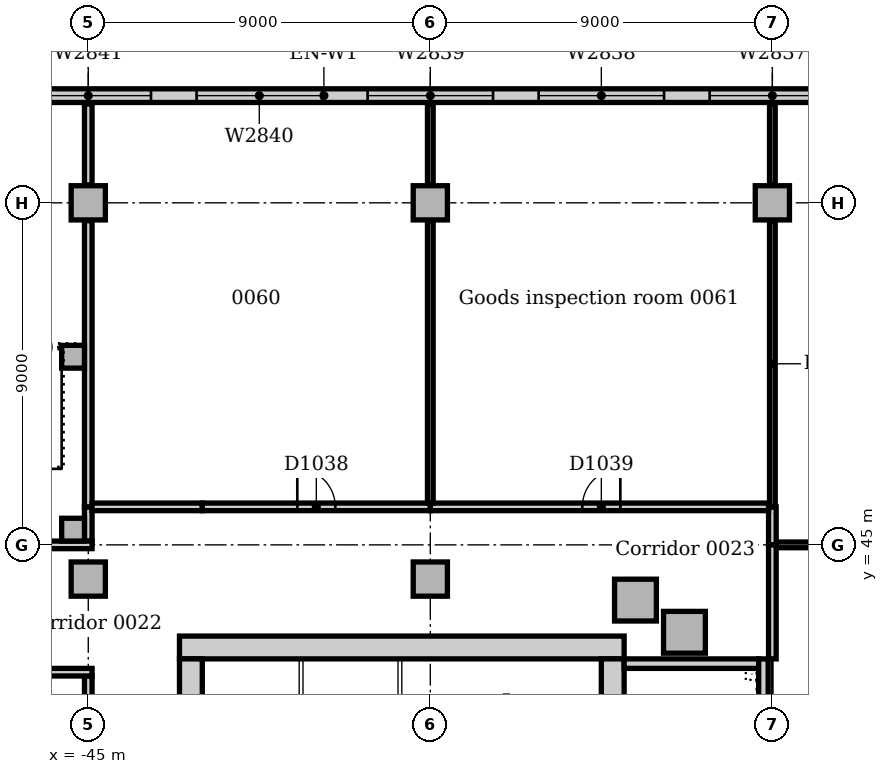
"""IFC4 building model, lengths in metres.
Left out: names, types, materials, properties, quantities, classifications, styles, units other than length and angle.
Written with IfcOpenShell. Run it as: python <this file> out.ifc"""

import sys

from ifc_helpers import new_model, si_unit, direction, frame, frame_2d, origin, origin_2d, place, context, subcontext, project, spatial, rectangle, extrude, element, fill, save


model = new_model("IFC4")
c1 = context("Model", 3, precision=1e-05, world=origin(), true_north=direction((0.0, 1.0)))
c2 = subcontext(c1, "Body", "Model", "MODEL_VIEW")
j1 = project(units=[si_unit("LENGTHUNIT", "METRE"), si_unit("PLANEANGLEUNIT", "RADIAN")], contexts=[c1])
p1 = place(None, origin())
s1 = spatial("IfcSite", under=j1, at=p1, CompositionType="ELEMENT")
p2 = place(p1, origin())
s2 = spatial("IfcBuilding", under=s1, at=p2, CompositionType="ELEMENT")
p3 = place(p2, origin())
s3 = spatial("IfcBuildingStorey", under=s2, at=p3, CompositionType="ELEMENT", Elevation=0.0)
p4 = place(p3, frame((-30.9, 42.3, 0.0), z_axis=(0.0, 0.0, 1.0), x_axis=(-1.0, 0.0, 0.0)))
e1 = element("IfcWall", 1, at=p4, inside=s3, PredefinedType="SOLIDWALL", context=c2, shape_type="SweptSolid", body=[
    extrude(rectangle(XDim=11.7, YDim=0.6, at=frame_2d((5.85, 0.0))), origin(), (0.0, 0.0, 1.0), 6.0),
])
p5 = place(p3, frame((-31.2, 30.5, 0.0), z_axis=(0.0, 0.0, 1.0), x_axis=(0.0, 1.0, 0.0)))
e2 = element("IfcWall", 2, at=p5, inside=s3, PredefinedType="SOLIDWALL", context=c2, shape_type="SweptSolid", body=[
    extrude(rectangle(XDim=11.5, YDim=0.6, at=frame_2d((5.75, 0.0))), origin(), (0.0, 0.0, 1.0), 6.0),
])
p6 = place(p5, frame((0.85, 0.0, 0.0)))
e3 = element("IfcOpeningElement", 3, at=p6, cuts=e2, PredefinedType="OPENING", context=c2, shape_type="SweptSolid", body=[
    extrude(rectangle(XDim=1.8, YDim=2.1, at=frame_2d((0.9, 1.05))), frame((0.0, 0.31, 0.0), z_axis=(0.0, -1.0, 0.0), x_axis=(1.0, 0.0, 0.0)), (0.0, 0.0, 1.0), 0.62),
])
p7 = place(p3, frame((-42.3, 42.0, 0.0), z_axis=(0.0, 0.0, 1.0), x_axis=(0.0, -1.0, 0.0)))
e4 = element("IfcWall", 4, at=p7, inside=s3, PredefinedType="SOLIDWALL", context=c2, shape_type="SweptSolid", body=[
    extrude(rectangle(XDim=11.5, YDim=0.6, at=frame_2d((5.75, 0.0))), origin(), (0.0, 0.0, 1.0), 6.0),
])
p8 = place(p7, frame((8.85, 0.0, 0.0)))
e5 = element("IfcOpeningElement", 5, at=p8, cuts=e4, PredefinedType="OPENING", context=c2, shape_type="SweptSolid", body=[
    extrude(rectangle(XDim=1.8, YDim=2.1, at=frame_2d((0.9, 1.05))), frame((0.0, 0.31, 0.0), z_axis=(0.0, -1.0, 0.0), x_axis=(1.0, 0.0, 0.0)), (0.0, 0.0, 1.0), 0.62),
])
p9 = place(p3, frame((-27.36, 41.875, 0.0), z_axis=(0.0, 0.0, 1.0), x_axis=(-1.0, 0.0, 0.0)))
e6 = element("IfcWall", 6, at=p9, inside=s3, PredefinedType="SOLIDWALL", context=c2, shape_type="SweptSolid", body=[
    extrude(rectangle(XDim=3.54, YDim=0.25, at=frame_2d((1.77, 0.0))), origin(), (0.0, 0.0, 1.0), 6.0),
])
p10 = place(p3, frame((-27.235, 35.35, 0.0), z_axis=(0.0, 0.0, 1.0), x_axis=(0.0, 1.0, 0.0)))
e7 = element("IfcWall", 7, at=p10, inside=s3, PredefinedType="SOLIDWALL", context=c2, shape_type="SweptSolid", body=[
    extrude(rectangle(XDim=6.65, YDim=0.25, at=frame_2d((3.325, 0.0))), origin(), (0.0, 0.0, 1.0), 6.0),
])
for number, where, z_axis, x_axis in (
    (8, (-29.313, 42.7, 0.0), (0.0, 0.0, 1.0), (1.0, 0.0, 0.0)),
    (9, (-30.602, 43.547, 0.0), (0.0, 0.0, 1.0), (1.0, 0.0, 0.0)),
):
    element("IfcColumn", number, at=place(p3, frame(where, z_axis=z_axis, x_axis=x_axis)), inside=s3, PredefinedType="COLUMN", context=c2, shape_type="SweptSolid", body=[
        extrude(rectangle(XDim=1.1, YDim=1.1, at=origin_2d()), origin(), (0.0, 0.0, 1.0), 5.7),
    ])
for number, where, z_axis, x_axis in (
    (10, (-45.0, 44.1, 0.0), (0.0, 0.0, 1.0), (1.0, 0.0, 0.0)),
    (11, (-36.0, 44.1, 0.0), (0.0, 0.0, 1.0), (1.0, 0.0, 0.0)),
    (12, (-45.0, 54.0, 0.0), (0.0, 0.0, 1.0), (1.0, 0.0, 0.0)),
    (13, (-36.0, 54.0, 0.0), (0.0, 0.0, 1.0), (1.0, 0.0, 0.0)),
    (14, (-27.0, 54.0, 0.0), (0.0, 0.0, 1.0), (1.0, 0.0, 0.0)),
):
    element("IfcColumn", number, at=place(p3, frame(where, z_axis=z_axis, x_axis=x_axis)), inside=s3, PredefinedType="COLUMN", context=c2, shape_type="SweptSolid", body=[
        extrude(rectangle(XDim=0.9, YDim=0.9, at=origin_2d()), origin(), (0.0, 0.0, 1.0), 5.7),
    ])
p11 = place(p3, frame((3.4, 56.82, 0.0), z_axis=(0.0, 0.0, 1.0), x_axis=(-1.0, 0.0, 0.0)))
e15 = element("IfcWall", 15, at=p11, inside=s3, PredefinedType="STANDARD", context=c2, shape_type="SweptSolid", body=[
    extrude(rectangle(XDim=84.4, YDim=0.36, at=frame_2d((42.2, 0.0))), origin(), (0.0, 0.0, 1.0), 5.7),
])
p12 = place(p11, frame((15.7, 0.0, 0.0)))
e16 = element("IfcOpeningElement", 16, at=p12, cuts=e15, PredefinedType="OPENING", context=c2, shape_type="SweptSolid", body=[
    extrude(rectangle(XDim=2.4, YDim=2.4, at=frame_2d((1.2, 1.2))), frame((0.0, 0.19, 0.0), z_axis=(0.0, -1.0, 0.0), x_axis=(1.0, 0.0, 0.0)), (0.0, 0.0, 1.0), 0.38),
])
p13 = place(p11, frame((76.6, 0.0, 0.0)))
e17 = element("IfcOpeningElement", 17, at=p13, cuts=e15, PredefinedType="OPENING", context=c2, shape_type="SweptSolid", body=[
    extrude(rectangle(XDim=6.6, YDim=4.2, at=frame_2d((3.3, 2.1))), frame((0.0, 0.19, 0.0), z_axis=(0.0, -1.0, 0.0), x_axis=(1.0, 0.0, 0.0)), (0.0, 0.0, 1.0), 0.38),
])
p14 = place(p11, frame((59.65, 0.0, 0.0)))
e18 = element("IfcOpeningElement", 18, at=p14, cuts=e15, PredefinedType="OPENING", context=c2, shape_type="SweptSolid", body=[
    extrude(rectangle(XDim=4.5, YDim=4.2, at=frame_2d((2.25, 2.1))), frame((0.0, 0.19, 0.0), z_axis=(0.0, -1.0, 0.0), x_axis=(1.0, 0.0, 0.0)), (0.0, 0.0, 1.0), 0.38),
])
p15 = place(p11, frame((58.3, 0.0, 0.0)))
e19 = element("IfcOpeningElement", 19, at=p15, cuts=e15, PredefinedType="OPENING", context=c2, shape_type="SweptSolid", body=[
    extrude(rectangle(XDim=1.2, YDim=2.2, at=frame_2d((0.6, 1.1))), frame((0.0, 0.19, 0.0), z_axis=(0.0, -1.0, 0.0), x_axis=(1.0, 0.0, 0.0)), (0.0, 0.0, 1.0), 0.38),
])
p16 = place(p11, frame((70.0, 0.0, 0.0)))
e20 = element("IfcOpeningElement", 20, at=p16, cuts=e15, PredefinedType="OPENING", context=c2, shape_type="SweptSolid", body=[
    extrude(rectangle(XDim=1.8, YDim=2.2, at=frame_2d((0.9, 1.1))), frame((0.0, 0.19, 0.0), z_axis=(0.0, -1.0, 0.0), x_axis=(1.0, 0.0, 0.0)), (0.0, 0.0, 1.0), 0.38),
])
p17 = place(p11, frame((52.0, 0.0, 0.0)))
e21 = element("IfcOpeningElement", 21, at=p17, cuts=e15, PredefinedType="OPENING", context=c2, shape_type="SweptSolid", body=[
    extrude(rectangle(XDim=1.8, YDim=2.2, at=frame_2d((0.9, 1.1))), frame((0.0, 0.19, 0.0), z_axis=(0.0, -1.0, 0.0), x_axis=(1.0, 0.0, 0.0)), (0.0, 0.0, 1.0), 0.38),
])
p18 = place(p11, frame((1.75, 0.0, 0.6)))
e22 = element("IfcOpeningElement", 22, at=p18, cuts=e15, PredefinedType="OPENING", context=c2, shape_type="SweptSolid", body=[
    extrude(rectangle(XDim=3.3, YDim=3.0, at=frame_2d((1.65, 1.5))), frame((0.0, 0.19, 0.0), z_axis=(0.0, -1.0, 0.0), x_axis=(1.0, 0.0, 0.0)), (0.0, 0.0, 1.0), 0.38),
])
p19 = place(p11, frame((6.25, 0.0, 0.6)))
e23 = element("IfcOpeningElement", 23, at=p19, cuts=e15, PredefinedType="OPENING", context=c2, shape_type="SweptSolid", body=[
    extrude(rectangle(XDim=3.3, YDim=3.0, at=frame_2d((1.65, 1.5))), frame((0.0, 0.19, 0.0), z_axis=(0.0, -1.0, 0.0), x_axis=(1.0, 0.0, 0.0)), (0.0, 0.0, 1.0), 0.38),
])
p20 = place(p11, frame((10.75, 0.0, 0.6)))
e24 = element("IfcOpeningElement", 24, at=p20, cuts=e15, PredefinedType="OPENING", context=c2, shape_type="SweptSolid", body=[
    extrude(rectangle(XDim=3.3, YDim=3.0, at=frame_2d((1.65, 1.5))), frame((0.0, 0.19, 0.0), z_axis=(0.0, -1.0, 0.0), x_axis=(1.0, 0.0, 0.0)), (0.0, 0.0, 1.0), 0.38),
])
p21 = place(p11, frame((19.75, 0.0, 0.6)))
e25 = element("IfcOpeningElement", 25, at=p21, cuts=e15, PredefinedType="OPENING", context=c2, shape_type="SweptSolid", body=[
    extrude(rectangle(XDim=3.3, YDim=3.0, at=frame_2d((1.65, 1.5))), frame((0.0, 0.19, 0.0), z_axis=(0.0, -1.0, 0.0), x_axis=(1.0, 0.0, 0.0)), (0.0, 0.0, 1.0), 0.38),
])
p22 = place(p11, frame((24.25, 0.0, 0.6)))
e26 = element("IfcOpeningElement", 26, at=p22, cuts=e15, PredefinedType="OPENING", context=c2, shape_type="SweptSolid", body=[
    extrude(rectangle(XDim=3.3, YDim=3.0, at=frame_2d((1.65, 1.5))), frame((0.0, 0.19, 0.0), z_axis=(0.0, -1.0, 0.0), x_axis=(1.0, 0.0, 0.0)), (0.0, 0.0, 1.0), 0.38),
])
p23 = place(p11, frame((28.75, 0.0, 0.6)))
e27 = element("IfcOpeningElement", 27, at=p23, cuts=e15, PredefinedType="OPENING", context=c2, shape_type="SweptSolid", body=[
    extrude(rectangle(XDim=3.3, YDim=3.0, at=frame_2d((1.65, 1.5))), frame((0.0, 0.19, 0.0), z_axis=(0.0, -1.0, 0.0), x_axis=(1.0, 0.0, 0.0)), (0.0, 0.0, 1.0), 0.38),
])
p24 = place(p11, frame((33.25, 0.0, 0.6)))
e28 = element("IfcOpeningElement", 28, at=p24, cuts=e15, PredefinedType="OPENING", context=c2, shape_type="SweptSolid", body=[
    extrude(rectangle(XDim=3.3, YDim=3.0, at=frame_2d((1.65, 1.5))), frame((0.0, 0.19, 0.0), z_axis=(0.0, -1.0, 0.0), x_axis=(1.0, 0.0, 0.0)), (0.0, 0.0, 1.0), 0.38),
])
p25 = place(p11, frame((37.75, 0.0, 0.6)))
e29 = element("IfcOpeningElement", 29, at=p25, cuts=e15, PredefinedType="OPENING", context=c2, shape_type="SweptSolid", body=[
    extrude(rectangle(XDim=3.3, YDim=3.0, at=frame_2d((1.65, 1.5))), frame((0.0, 0.19, 0.0), z_axis=(0.0, -1.0, 0.0), x_axis=(1.0, 0.0, 0.0)), (0.0, 0.0, 1.0), 0.38),
])
p26 = place(p11, frame((42.25, 0.0, 0.6)))
e30 = element("IfcOpeningElement", 30, at=p26, cuts=e15, PredefinedType="OPENING", context=c2, shape_type="SweptSolid", body=[
    extrude(rectangle(XDim=3.3, YDim=3.0, at=frame_2d((1.65, 1.5))), frame((0.0, 0.19, 0.0), z_axis=(0.0, -1.0, 0.0), x_axis=(1.0, 0.0, 0.0)), (0.0, 0.0, 1.0), 0.38),
])
p27 = place(p11, frame((46.75, 0.0, 0.6)))
e31 = element("IfcOpeningElement", 31, at=p27, cuts=e15, PredefinedType="OPENING", context=c2, shape_type="SweptSolid", body=[
    extrude(rectangle(XDim=3.3, YDim=3.0, at=frame_2d((1.65, 1.5))), frame((0.0, 0.19, 0.0), z_axis=(0.0, -1.0, 0.0), x_axis=(1.0, 0.0, 0.0)), (0.0, 0.0, 1.0), 0.38),
])
for number, where, z_axis, x_axis in (
    (32, (-45.4, 49.95, 0.0), (0.0, 0.0, 1.0), (1.0, 0.0, 0.0)),
    (33, (-45.4, 45.4, 0.0), (0.0, 0.0, 1.0), (1.0, 0.0, 0.0)),
):
    element("IfcColumn", number, at=place(p3, frame(where, z_axis=z_axis, x_axis=x_axis)), inside=s3, PredefinedType="COLUMN", context=c2, shape_type="SweptSolid", body=[
        extrude(rectangle(XDim=0.6, YDim=0.6, at=origin_2d()), origin(), (0.0, 0.0, 1.0), 6.0),
    ])
p28 = place(p3, frame((-45.0, 45.1, 0.0), z_axis=(0.0, 0.0, 1.0), x_axis=(0.0, 1.0, 0.0)))
e34 = element("IfcWall", 34, at=p28, inside=s3, PredefinedType="SOLIDWALL", context=c2, shape_type="SweptSolid", body=[
    extrude(rectangle(XDim=0.9, YDim=0.2, at=frame_2d((0.45, 0.0))), origin(), (0.0, 0.0, 1.0), 5.7),
])
p29 = place(p3, frame((-54.0, 45.0, 0.0), z_axis=(0.0, 0.0, 1.0), x_axis=(1.0, 0.0, 0.0)))
e35 = element("IfcWall", 35, at=p29, inside=s3, PredefinedType="SOLIDWALL", context=c2, shape_type="SweptSolid", body=[
    extrude(rectangle(XDim=9.1, YDim=0.2, at=frame_2d((4.55, 0.0))), origin(), (0.0, 0.0, 1.0), 5.7),
])
p30 = place(p3, frame((-45.0, 46.0, 0.0), z_axis=(0.0, 0.0, 1.0), x_axis=(0.0, 1.0, 0.0)))
e36 = element("IfcWall", 36, at=p30, inside=s3, PredefinedType="SOLIDWALL", context=c2, shape_type="SweptSolid", body=[
    extrude(rectangle(XDim=7.53, YDim=0.2, at=frame_2d((3.765, 0.0))), origin(), (0.0, 0.0, 1.0), 5.7),
])
p31 = place(p3, frame((-45.0, 54.47, 0.0), z_axis=(0.0, 0.0, 1.0), x_axis=(0.0, 1.0, 0.0)))
e37 = element("IfcWall", 37, at=p31, inside=s3, PredefinedType="SOLIDWALL", context=c2, shape_type="SweptSolid", body=[
    extrude(rectangle(XDim=2.13, YDim=0.2, at=frame_2d((1.065, 0.0))), origin(), (0.0, 0.0, 1.0), 5.7),
])
p32 = place(p3, frame((-26.9, 45.0, 0.0), z_axis=(0.0, 0.0, 1.0), x_axis=(1.0, 0.0, 0.0)))
e38 = element("IfcWall", 38, at=p32, inside=s3, PredefinedType="PARTITIONING", context=c2, shape_type="SweptSolid", body=[
    extrude(rectangle(XDim=8.43, YDim=0.15, at=frame_2d((4.215, 0.0))), origin(), (0.0, 0.0, 1.0), 5.7),
])
p33 = place(p3, frame((-27.0, 45.0, 0.0), z_axis=(0.0, 0.0, 1.0), x_axis=(0.0, 1.0, 0.0)))
e39 = element("IfcWall", 39, at=p33, inside=s3, PredefinedType="PARTITIONING", context=c2, shape_type="SweptSolid", body=[
    extrude(rectangle(XDim=1.0, YDim=0.2, at=frame_2d((0.5, 0.0))), origin(), (0.0, 0.0, 1.0), 5.7),
])
p34 = place(p3, frame((-27.0, 46.0, 0.0), z_axis=(0.0, 0.0, 1.0), x_axis=(0.0, 1.0, 0.0)))
e40 = element("IfcWall", 40, at=p34, inside=s3, PredefinedType="PARTITIONING", context=c2, shape_type="SweptSolid", body=[
    extrude(rectangle(XDim=7.53, YDim=0.15, at=frame_2d((3.765, 0.0))), origin(), (0.0, 0.0, 1.0), 5.7),
])
p35 = place(p3, frame((-27.0, 54.47, 0.0), z_axis=(0.0, 0.0, 1.0), x_axis=(0.0, 1.0, 0.0)))
e41 = element("IfcWall", 41, at=p35, inside=s3, PredefinedType="PARTITIONING", context=c2, shape_type="SweptSolid", body=[
    extrude(rectangle(XDim=2.13, YDim=0.15, at=frame_2d((1.065, 0.0))), origin(), (0.0, 0.0, 1.0), 5.7),
])
p36 = place(p3, frame((-27.0, 42.0, 0.0), z_axis=(0.0, 0.0, 1.0), x_axis=(0.0, 1.0, 0.0)))
e42 = element("IfcWall", 42, at=p36, inside=s3, PredefinedType="PARTITIONING", context=c2, shape_type="SweptSolid", body=[
    extrude(rectangle(XDim=3.0, YDim=0.2, at=frame_2d((1.5, 0.0))), origin(), (0.0, 0.0, 1.0), 5.7),
])
p37 = place(p3, frame((-45.0, 36.42, 0.0), z_axis=(0.0, 0.0, 1.0), x_axis=(0.0, 1.0, 0.0)))
e43 = element("IfcWall", 43, at=p37, inside=s3, PredefinedType="PARTITIONING", context=c2, shape_type="SweptSolid", body=[
    extrude(rectangle(XDim=5.13, YDim=0.2, at=frame_2d((2.565, 0.0))), origin(), (0.0, 0.0, 1.0), 5.7),
])
p38 = place(p3, frame((-52.5, 41.65, 0.0), z_axis=(0.0, 0.0, 1.0), x_axis=(1.0, 0.0, 0.0)))
e44 = element("IfcWall", 44, at=p38, inside=s3, PredefinedType="PARTITIONING", context=c2, shape_type="SweptSolid", body=[
    extrude(rectangle(XDim=7.6, YDim=0.2, at=frame_2d((3.8, 0.0))), origin(), (0.0, 0.0, 1.0), 5.7),
])
p39 = place(p3, frame((-44.9, 46.0, 0.0), z_axis=(0.0, 0.0, 1.0), x_axis=(1.0, 0.0, 0.0)))
e45 = element("IfcWall", 45, at=p39, inside=s3, PredefinedType="PARTITIONING", context=c2, shape_type="SweptSolid", body=[
    extrude(rectangle(XDim=2.9, YDim=0.2, at=frame_2d((1.45, 0.0))), origin(), (0.0, 0.0, 1.0), 5.7),
])
p40 = place(p3, frame((-42.0, 46.0, 0.0), z_axis=(0.0, 0.0, 1.0), x_axis=(1.0, 0.0, 0.0)))
e46 = element("IfcWall", 46, at=p40, inside=s3, PredefinedType="PARTITIONING", context=c2, shape_type="SweptSolid", body=[
    extrude(rectangle(XDim=6.0, YDim=0.2, at=frame_2d((3.0, 0.0))), origin(), (0.0, 0.0, 1.0), 5.7),
])
p41 = place(p40, frame((2.5, 0.0, 0.0)))
e47 = element("IfcOpeningElement", 47, at=p41, cuts=e46, PredefinedType="OPENING", context=c2, shape_type="SweptSolid", body=[
    extrude(rectangle(XDim=1.0, YDim=2.1, at=frame_2d((0.5, 1.05))), frame((0.0, 0.11, 0.0), z_axis=(0.0, -1.0, 0.0), x_axis=(1.0, 0.0, 0.0)), (0.0, 0.0, 1.0), 0.22),
])
p42 = place(p3, frame((-36.0, 46.0, 0.0), z_axis=(0.0, 0.0, 1.0), x_axis=(1.0, 0.0, 0.0)))
e48 = element("IfcWall", 48, at=p42, inside=s3, PredefinedType="PARTITIONING", context=c2, shape_type="SweptSolid", body=[
    extrude(rectangle(XDim=8.9, YDim=0.2, at=frame_2d((4.45, 0.0))), origin(), (0.0, 0.0, 1.0), 5.7),
])
p43 = place(p42, frame((4.0, 0.0, 0.0)))
e49 = element("IfcOpeningElement", 49, at=p43, cuts=e48, PredefinedType="OPENING", context=c2, shape_type="SweptSolid", body=[
    extrude(rectangle(XDim=1.0, YDim=2.1, at=frame_2d((0.5, 1.05))), frame((0.0, 0.11, 0.0), z_axis=(0.0, -1.0, 0.0), x_axis=(1.0, 0.0, 0.0)), (0.0, 0.0, 1.0), 0.22),
])
p44 = place(p3, frame((-36.0, 46.1, 0.0), z_axis=(0.0, 0.0, 1.0), x_axis=(0.0, 1.0, 0.0)))
e50 = element("IfcWall", 50, at=p44, inside=s3, PredefinedType="PARTITIONING", context=c2, shape_type="SweptSolid", body=[
    extrude(rectangle(XDim=7.43, YDim=0.15, at=frame_2d((3.715, 0.0))), origin(), (0.0, 0.0, 1.0), 5.7),
])
p45 = place(p3, frame((-36.0, 54.47, 0.0), z_axis=(0.0, 0.0, 1.0), x_axis=(0.0, 1.0, 0.0)))
e51 = element("IfcWall", 51, at=p45, inside=s3, PredefinedType="PARTITIONING", context=c2, shape_type="SweptSolid", body=[
    extrude(rectangle(XDim=2.13, YDim=0.15, at=frame_2d((1.065, 0.0))), origin(), (0.0, 0.0, 1.0), 5.7),
])
p46 = place(p3, frame((-34.0, 41.075, 0.0), z_axis=(0.0, 0.0, 1.0), x_axis=(0.0, -1.0, 0.0)))
e52 = element("IfcWall", 52, at=p46, inside=s3, PredefinedType="SOLIDWALL", context=c2, shape_type="SweptSolid", body=[
    extrude(rectangle(XDim=7.0, YDim=0.15, at=frame_2d((3.5, 0.0))), origin(), (0.0, 0.0, 1.0), 6.0),
])
for number, where, z_axis, x_axis in (
    (53, (-39.4, 34.075, 0.0), (0.0, 0.0, 1.0), (0.0, 1.0, 0.0)),
    (54, (-36.8, 34.075, 0.0), (0.0, 0.0, 1.0), (0.0, 1.0, 0.0)),
):
    element("IfcWall", number, at=place(p3, frame(where, z_axis=z_axis, x_axis=x_axis)), inside=s3, PredefinedType="PARTITIONING", context=c2, shape_type="SweptSolid", body=[
        extrude(rectangle(XDim=7.925, YDim=0.1, at=frame_2d((3.962, 0.0))), origin(), (0.0, 0.0, 1.0), 5.7),
    ])
p47 = place(p23, origin())
e55 = element("IfcWindow", 55, at=p47, inside=s3, PartitioningType="SINGLE_PANEL", PredefinedType="WINDOW", context=c2, shape_type="SweptSolid", body=[
    extrude(rectangle(XDim=3.3, YDim=3.0, at=frame_2d((1.65, 1.5))), frame((0.0, 0.13, 0.0), z_axis=(0.0, -1.0, 0.0), x_axis=(1.0, 0.0, 0.0)), (0.0, 0.0, 1.0), 0.06),
])
fill(e27, e55)
p48 = place(p24, origin())
e56 = element("IfcWindow", 56, at=p48, inside=s3, PartitioningType="SINGLE_PANEL", PredefinedType="WINDOW", context=c2, shape_type="SweptSolid", body=[
    extrude(rectangle(XDim=3.3, YDim=3.0, at=frame_2d((1.65, 1.5))), frame((0.0, 0.13, 0.0), z_axis=(0.0, -1.0, 0.0), x_axis=(1.0, 0.0, 0.0)), (0.0, 0.0, 1.0), 0.06),
])
fill(e28, e56)
p49 = place(p25, origin())
e57 = element("IfcWindow", 57, at=p49, inside=s3, PartitioningType="SINGLE_PANEL", PredefinedType="WINDOW", context=c2, shape_type="SweptSolid", body=[
    extrude(rectangle(XDim=3.3, YDim=3.0, at=frame_2d((1.65, 1.5))), frame((0.0, 0.13, 0.0), z_axis=(0.0, -1.0, 0.0), x_axis=(1.0, 0.0, 0.0)), (0.0, 0.0, 1.0), 0.06),
])
fill(e29, e57)
p50 = place(p26, origin())
e58 = element("IfcWindow", 58, at=p50, inside=s3, PartitioningType="SINGLE_PANEL", PredefinedType="WINDOW", context=c2, shape_type="SweptSolid", body=[
    extrude(rectangle(XDim=3.3, YDim=3.0, at=frame_2d((1.65, 1.5))), frame((0.0, 0.13, 0.0), z_axis=(0.0, -1.0, 0.0), x_axis=(1.0, 0.0, 0.0)), (0.0, 0.0, 1.0), 0.06),
])
fill(e30, e58)
p51 = place(p27, origin())
e59 = element("IfcWindow", 59, at=p51, inside=s3, PartitioningType="SINGLE_PANEL", PredefinedType="WINDOW", context=c2, shape_type="SweptSolid", body=[
    extrude(rectangle(XDim=3.3, YDim=3.0, at=frame_2d((1.65, 1.5))), frame((0.0, 0.13, 0.0), z_axis=(0.0, -1.0, 0.0), x_axis=(1.0, 0.0, 0.0)), (0.0, 0.0, 1.0), 0.06),
])
fill(e31, e59)
p52 = place(p41, origin())
e60 = element("IfcDoor", 60, at=p52, inside=s3, OperationType="SINGLE_SWING_LEFT", PredefinedType="DOOR", context=c2, shape_type="SweptSolid", body=[
    extrude(rectangle(XDim=1.0, YDim=2.1, at=frame_2d((0.5, 1.05))), frame((0.0, 0.025, 0.0), z_axis=(0.0, -1.0, 0.0), x_axis=(1.0, 0.0, 0.0)), (0.0, 0.0, 1.0), 0.05),
])
fill(e47, e60)
p53 = place(p43, origin())
e61 = element("IfcDoor", 61, at=p53, inside=s3, OperationType="SINGLE_SWING_RIGHT", PredefinedType="DOOR", context=c2, shape_type="SweptSolid", body=[
    extrude(rectangle(XDim=1.0, YDim=2.1, at=frame_2d((0.5, 1.05))), frame((0.0, 0.025, 0.0), z_axis=(0.0, -1.0, 0.0), x_axis=(1.0, 0.0, 0.0)), (0.0, 0.0, 1.0), 0.05),
])
fill(e49, e61)
save(model, sys.argv[1])
